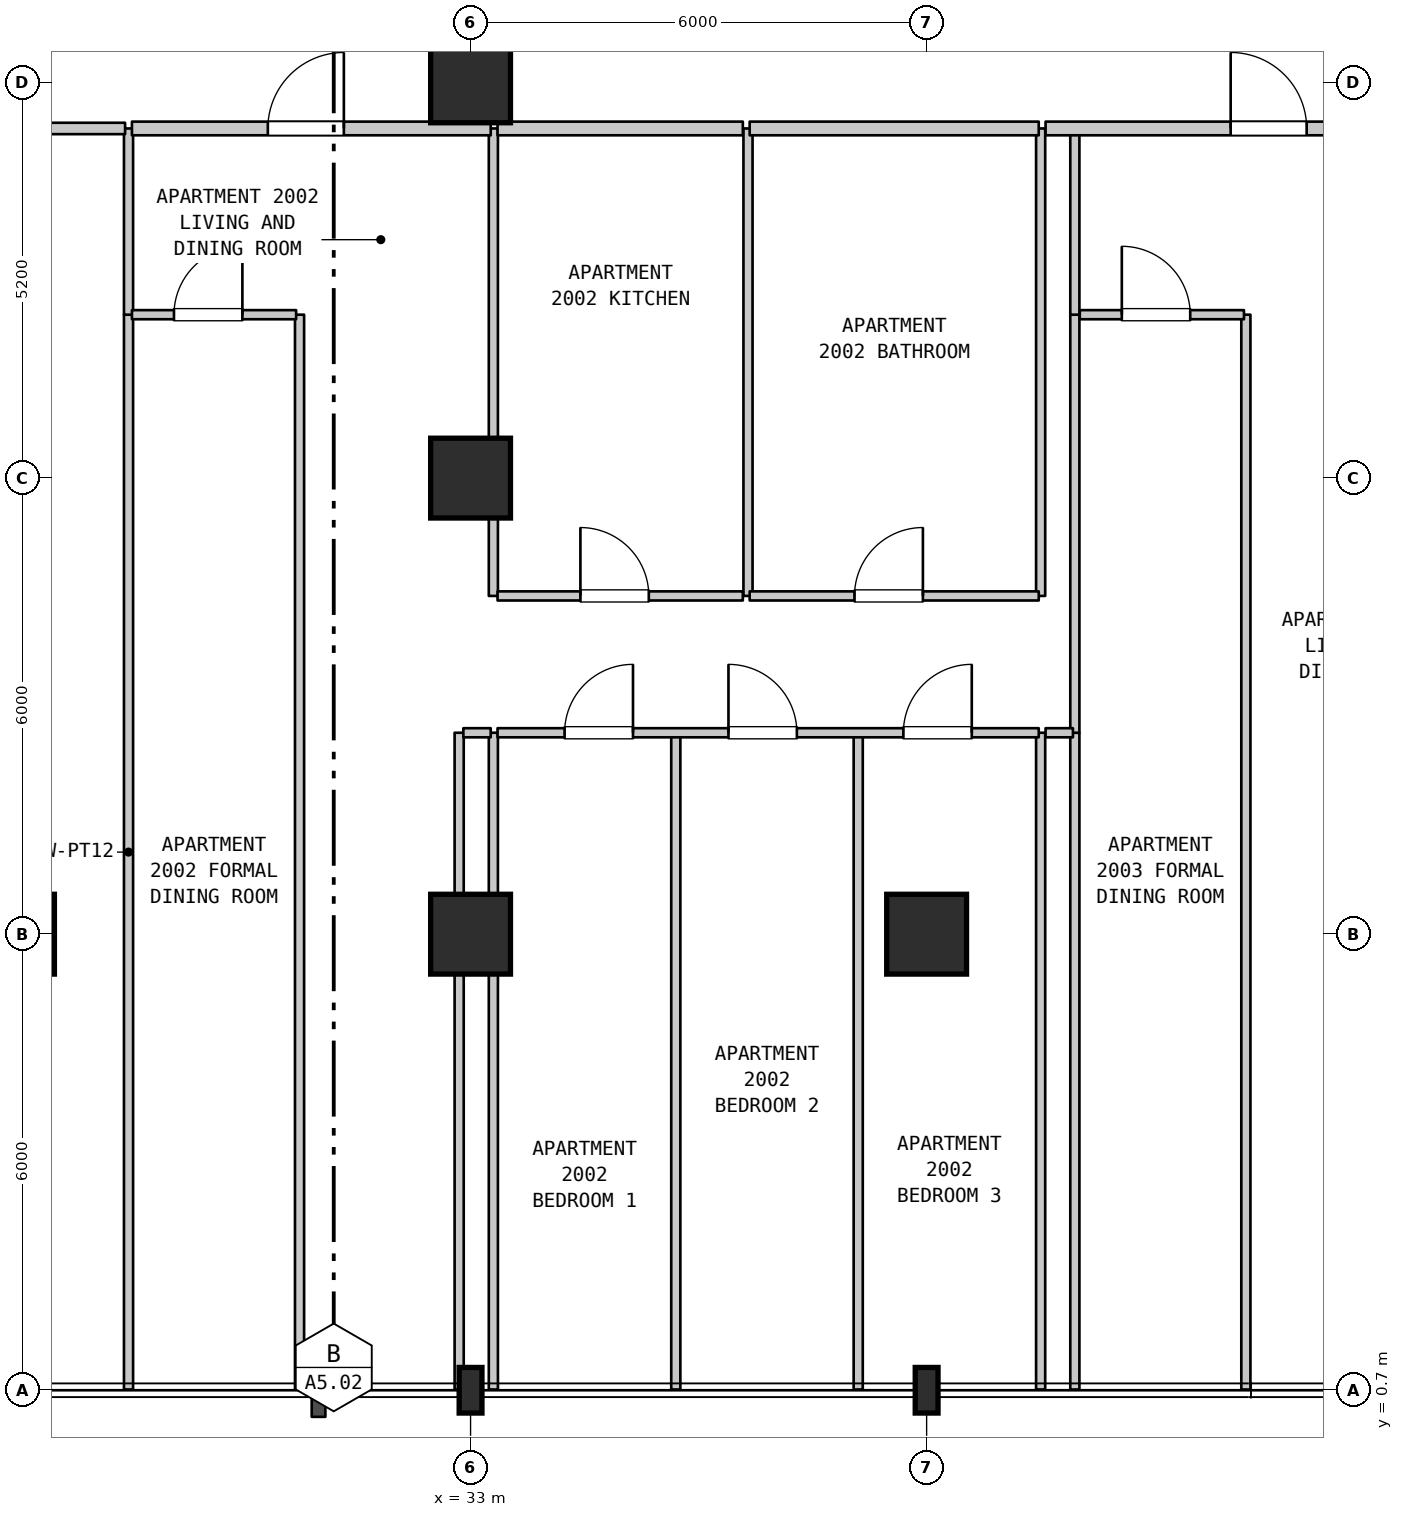
"""IFC4 building model, lengths in metres.
Left out: names, types, materials, properties, quantities, classifications, styles, units other than length and angle.
Written with IfcOpenShell. Run it as: python <this file> out.ifc"""

import sys

from ifc_helpers import new_model, si_unit, direction, frame, frame_2d, origin, origin_2d, place, context, subcontext, project, spatial, rectangle, i_section, extrude, element, fill, save


model = new_model("IFC4")
c1 = context("Model", 3, precision=1e-05, world=origin(), true_north=direction((0.0, 1.0)))
c2 = subcontext(c1, "Body", "Model", "MODEL_VIEW")
j1 = project(units=[si_unit("LENGTHUNIT", "METRE"), si_unit("PLANEANGLEUNIT", "RADIAN")], contexts=[c1])
p1 = place(None, origin())
s1 = spatial("IfcSite", under=j1, at=p1, CompositionType="ELEMENT")
p2 = place(p1, origin())
s2 = spatial("IfcBuilding", under=s1, at=p2, CompositionType="ELEMENT")
p3 = place(p2, frame((0.0, 0.0, 86.4)))
s3 = spatial("IfcBuildingStorey", under=s2, at=p3, CompositionType="ELEMENT", Elevation=86.4)
p4 = place(p3, frame((27.0, 6.7, 0.0), z_axis=(0.0, 0.0, 1.0), x_axis=(1.0, 0.0, 0.0)))
e1 = element("IfcColumn", 1, at=p4, inside=s3, PredefinedType="COLUMN", context=c2, shape_type="SweptSolid", body=[
    extrude(rectangle(XDim=1.05, YDim=1.05, at=origin_2d()), origin(), (0.0, 0.0, 1.0), 4.5),
])
p5 = place(p3, frame((33.0, 0.7, 0.0), z_axis=(0.0, 0.0, 1.0), x_axis=(1.0, 0.0, 0.0)))
e2 = element("IfcColumn", 2, at=p5, inside=s3, PredefinedType="COLUMN", context=c2, shape_type="SweptSolid", body=[
    extrude(i_section(OverallWidth=0.3, OverallDepth=0.6, WebThickness=0.015, FlangeThickness=0.03, FilletRadius=0.027, at=origin_2d()), origin(), (0.0, 0.0, 1.0), 4.5),
])
for number, where, z_axis, x_axis in (
    (3, (33.0, 6.7, 0.0), (0.0, 0.0, 1.0), (1.0, 0.0, 0.0)),
    (4, (33.0, 12.7, 0.0), (0.0, 0.0, 1.0), (1.0, 0.0, 0.0)),
    (5, (33.0, 17.9, 0.0), (0.0, 0.0, 1.0), (1.0, 0.0, 0.0)),
):
    element("IfcColumn", number, at=place(p3, frame(where, z_axis=z_axis, x_axis=x_axis)), inside=s3, PredefinedType="COLUMN", context=c2, shape_type="SweptSolid", body=[
        extrude(rectangle(XDim=1.05, YDim=1.05, at=origin_2d()), origin(), (0.0, 0.0, 1.0), 4.5),
    ])
p6 = place(p3, frame((39.0, 0.7, 0.0), z_axis=(0.0, 0.0, 1.0), x_axis=(1.0, 0.0, 0.0)))
e6 = element("IfcColumn", 6, at=p6, inside=s3, PredefinedType="COLUMN", context=c2, shape_type="SweptSolid", body=[
    extrude(i_section(OverallWidth=0.3, OverallDepth=0.6, WebThickness=0.015, FlangeThickness=0.03, FilletRadius=0.027, at=origin_2d()), origin(), (0.0, 0.0, 1.0), 4.5),
])
p7 = place(p3, frame((39.0, 6.7, 0.0), z_axis=(0.0, 0.0, 1.0), x_axis=(1.0, 0.0, 0.0)))
e7 = element("IfcColumn", 7, at=p7, inside=s3, PredefinedType="COLUMN", context=c2, shape_type="SweptSolid", body=[
    extrude(rectangle(XDim=1.05, YDim=1.05, at=origin_2d()), origin(), (0.0, 0.0, 1.0), 4.5),
])
p8 = place(p3, frame((28.5, 0.71, 0.0), z_axis=(0.0, 0.0, 1.0), x_axis=(0.0, 1.0, 0.0)))
e8 = element("IfcWall", 8, at=p8, inside=s3, PredefinedType="PARTITIONING", context=c2, shape_type="SweptSolid", body=[
    extrude(rectangle(XDim=14.14, YDim=0.12, at=frame_2d((7.07, 0.0))), origin(), (0.0, 0.0, 1.0), 4.185),
])
p9 = place(p3, frame((28.5, 14.85, 0.0), z_axis=(0.0, 0.0, 1.0), x_axis=(0.0, 1.0, 0.0)))
e9 = element("IfcWall", 9, at=p9, inside=s3, PredefinedType="PARTITIONING", context=c2, shape_type="SweptSolid", body=[
    extrude(rectangle(XDim=2.45, YDim=0.12, at=frame_2d((1.225, 0.0))), origin(), (0.0, 0.0, 1.0), 4.185),
])
p10 = place(p3, frame((30.75, 0.71, 0.0), z_axis=(0.0, 0.0, 1.0), x_axis=(0.0, 1.0, 0.0)))
e10 = element("IfcWall", 10, at=p10, inside=s3, PredefinedType="PARTITIONING", context=c2, shape_type="SweptSolid", body=[
    extrude(rectangle(XDim=14.14, YDim=0.12, at=frame_2d((7.07, 0.0))), origin(), (0.0, 0.0, 1.0), 4.185),
])
for number, where, z_axis, x_axis in (
    (11, (32.85, 0.71, 0.0), (0.0, 0.0, 1.0), (0.0, 1.0, 0.0)),
    (12, (33.3, 0.71, 0.0), (0.0, 0.0, 1.0), (0.0, 1.0, 0.0)),
):
    element("IfcWall", number, at=place(p3, frame(where, z_axis=z_axis, x_axis=x_axis)), inside=s3, PredefinedType="PARTITIONING", context=c2, shape_type="SweptSolid", body=[
        extrude(rectangle(XDim=8.64, YDim=0.12, at=frame_2d((4.32, 0.0))), origin(), (0.0, 0.0, 1.0), 4.185),
    ])
p11 = place(p3, frame((33.3, 11.15, 0.0), z_axis=(0.0, 0.0, 1.0), x_axis=(0.0, 1.0, 0.0)))
e13 = element("IfcWall", 13, at=p11, inside=s3, PredefinedType="PARTITIONING", context=c2, shape_type="SweptSolid", body=[
    extrude(rectangle(XDim=6.15, YDim=0.12, at=frame_2d((3.075, 0.0))), origin(), (0.0, 0.0, 1.0), 4.185),
])
p12 = place(p3, frame((35.7, 0.71, 0.0), z_axis=(0.0, 0.0, 1.0), x_axis=(0.0, 1.0, 0.0)))
e14 = element("IfcWall", 14, at=p12, inside=s3, PredefinedType="PARTITIONING", context=c2, shape_type="SweptSolid", body=[
    extrude(rectangle(XDim=8.64, YDim=0.12, at=frame_2d((4.32, 0.0))), origin(), (0.0, 0.0, 1.0), 4.185),
])
p13 = place(p3, frame((36.65, 11.15, 0.0), z_axis=(0.0, 0.0, 1.0), x_axis=(0.0, 1.0, 0.0)))
e15 = element("IfcWall", 15, at=p13, inside=s3, PredefinedType="PARTITIONING", context=c2, shape_type="SweptSolid", body=[
    extrude(rectangle(XDim=6.15, YDim=0.12, at=frame_2d((3.075, 0.0))), origin(), (0.0, 0.0, 1.0), 4.185),
])
for number, where, z_axis, x_axis in (
    (16, (38.1, 0.71, 0.0), (0.0, 0.0, 1.0), (0.0, 1.0, 0.0)),
    (17, (40.5, 0.71, 0.0), (0.0, 0.0, 1.0), (0.0, 1.0, 0.0)),
):
    element("IfcWall", number, at=place(p3, frame(where, z_axis=z_axis, x_axis=x_axis)), inside=s3, PredefinedType="PARTITIONING", context=c2, shape_type="SweptSolid", body=[
        extrude(rectangle(XDim=8.64, YDim=0.12, at=frame_2d((4.32, 0.0))), origin(), (0.0, 0.0, 1.0), 4.185),
    ])
p14 = place(p3, frame((40.5, 11.15, 0.0), z_axis=(0.0, 0.0, 1.0), x_axis=(0.0, 1.0, 0.0)))
e18 = element("IfcWall", 18, at=p14, inside=s3, PredefinedType="PARTITIONING", context=c2, shape_type="SweptSolid", body=[
    extrude(rectangle(XDim=6.15, YDim=0.12, at=frame_2d((3.075, 0.0))), origin(), (0.0, 0.0, 1.0), 4.185),
])
p15 = place(p3, frame((40.95, 0.71, 0.0), z_axis=(0.0, 0.0, 1.0), x_axis=(0.0, 1.0, 0.0)))
e19 = element("IfcWall", 19, at=p15, inside=s3, PredefinedType="PARTITIONING", context=c2, shape_type="SweptSolid", body=[
    extrude(rectangle(XDim=8.64, YDim=0.12, at=frame_2d((4.32, 0.0))), origin(), (0.0, 0.0, 1.0), 4.185),
])
p16 = place(p3, frame((40.95, 9.35, 0.0), z_axis=(0.0, 0.0, 1.0), x_axis=(0.0, 1.0, 0.0)))
e20 = element("IfcWall", 20, at=p16, inside=s3, PredefinedType="PARTITIONING", context=c2, shape_type="SweptSolid", body=[
    extrude(rectangle(XDim=5.5, YDim=0.12, at=frame_2d((2.75, 0.0))), origin(), (0.0, 0.0, 1.0), 4.185),
])
p17 = place(p3, frame((40.95, 14.85, 0.0), z_axis=(0.0, 0.0, 1.0), x_axis=(0.0, 1.0, 0.0)))
e21 = element("IfcWall", 21, at=p17, inside=s3, PredefinedType="PARTITIONING", context=c2, shape_type="SweptSolid", body=[
    extrude(rectangle(XDim=2.45, YDim=0.12, at=frame_2d((1.225, 0.0))), origin(), (0.0, 0.0, 1.0), 4.185),
])
p18 = place(p3, frame((43.2, 0.71, 0.0), z_axis=(0.0, 0.0, 1.0), x_axis=(0.0, 1.0, 0.0)))
e22 = element("IfcWall", 22, at=p18, inside=s3, PredefinedType="PARTITIONING", context=c2, shape_type="SweptSolid", body=[
    extrude(rectangle(XDim=14.14, YDim=0.12, at=frame_2d((7.07, 0.0))), origin(), (0.0, 0.0, 1.0), 4.185),
])
p19 = place(p3, frame((32.905, 9.35, 0.0), z_axis=(0.0, 0.0, 1.0), x_axis=(1.0, 0.0, 0.0)))
e23 = element("IfcWall", 23, at=p19, inside=s3, PredefinedType="PARTITIONING", context=c2, shape_type="SweptSolid", body=[
    extrude(rectangle(XDim=0.36, YDim=0.12, at=frame_2d((0.18, 0.0))), origin(), (0.0, 0.0, 1.0), 4.185),
])
p20 = place(p3, frame((33.355, 9.35, 0.0), z_axis=(0.0, 0.0, 1.0), x_axis=(1.0, 0.0, 0.0)))
e24 = element("IfcWall", 24, at=p20, inside=s3, PredefinedType="PARTITIONING", context=c2, shape_type="SweptSolid", body=[
    extrude(rectangle(XDim=7.12, YDim=0.12, at=frame_2d((3.56, 0.0))), origin(), (0.0, 0.0, 1.0), 4.185),
])
p21 = place(p20, frame((0.882, 0.0, 0.0)))
e25 = element("IfcOpeningElement", 25, at=p21, cuts=e24, PredefinedType="OPENING", context=c2, shape_type="SweptSolid", body=[
    extrude(rectangle(XDim=0.9, YDim=2.15, at=frame_2d((0.45, 1.075))), frame((0.0, 0.07, 0.0), z_axis=(0.0, -1.0, 0.0), x_axis=(1.0, 0.0, 0.0)), (0.0, 0.0, 1.0), 0.14),
])
p22 = place(p20, frame((3.038, 0.0, 0.0)))
e26 = element("IfcOpeningElement", 26, at=p22, cuts=e24, PredefinedType="OPENING", context=c2, shape_type="SweptSolid", body=[
    extrude(rectangle(XDim=0.9, YDim=2.15, at=frame_2d((0.45, 1.075))), frame((0.0, 0.07, 0.0), z_axis=(0.0, -1.0, 0.0), x_axis=(1.0, 0.0, 0.0)), (0.0, 0.0, 1.0), 0.14),
])
p23 = place(p20, frame((5.339, 0.0, 0.0)))
e27 = element("IfcOpeningElement", 27, at=p23, cuts=e24, PredefinedType="OPENING", context=c2, shape_type="SweptSolid", body=[
    extrude(rectangle(XDim=0.9, YDim=2.15, at=frame_2d((0.45, 1.075))), frame((0.0, 0.07, 0.0), z_axis=(0.0, -1.0, 0.0), x_axis=(1.0, 0.0, 0.0)), (0.0, 0.0, 1.0), 0.14),
])
p24 = place(p3, frame((40.565, 9.35, 0.0), z_axis=(0.0, 0.0, 1.0), x_axis=(1.0, 0.0, 0.0)))
e28 = element("IfcWall", 28, at=p24, inside=s3, PredefinedType="PARTITIONING", context=c2, shape_type="SweptSolid", body=[
    extrude(rectangle(XDim=0.36, YDim=0.12, at=frame_2d((0.18, 0.0))), origin(), (0.0, 0.0, 1.0), 4.185),
])
p25 = place(p3, frame((33.355, 11.15, 0.0), z_axis=(0.0, 0.0, 1.0), x_axis=(1.0, 0.0, 0.0)))
e29 = element("IfcWall", 29, at=p25, inside=s3, PredefinedType="PARTITIONING", context=c2, shape_type="SweptSolid", body=[
    extrude(rectangle(XDim=3.227, YDim=0.12, at=frame_2d((1.614, 0.0))), origin(), (0.0, 0.0, 1.0), 4.185),
])
p26 = place(p25, frame((1.09, 0.0, 0.0)))
e30 = element("IfcOpeningElement", 30, at=p26, cuts=e29, PredefinedType="OPENING", context=c2, shape_type="SweptSolid", body=[
    extrude(rectangle(XDim=0.9, YDim=2.15, at=frame_2d((0.45, 1.075))), frame((0.0, 0.07, 0.0), z_axis=(0.0, -1.0, 0.0), x_axis=(1.0, 0.0, 0.0)), (0.0, 0.0, 1.0), 0.14),
])
p27 = place(p3, frame((36.672, 11.15, 0.0), z_axis=(0.0, 0.0, 1.0), x_axis=(1.0, 0.0, 0.0)))
e31 = element("IfcWall", 31, at=p27, inside=s3, PredefinedType="PARTITIONING", context=c2, shape_type="SweptSolid", body=[
    extrude(rectangle(XDim=3.803, YDim=0.12, at=frame_2d((1.901, 0.0))), origin(), (0.0, 0.0, 1.0), 4.185),
])
p28 = place(p27, frame((1.379, 0.0, 0.0)))
e32 = element("IfcOpeningElement", 32, at=p28, cuts=e31, PredefinedType="OPENING", context=c2, shape_type="SweptSolid", body=[
    extrude(rectangle(XDim=0.9, YDim=2.1, at=frame_2d((0.45, 1.05))), frame((0.0, 0.07, 0.0), z_axis=(0.0, -1.0, 0.0), x_axis=(1.0, 0.0, 0.0)), (0.0, 0.0, 1.0), 0.14),
])
p29 = place(p3, frame((28.545, 14.85, 0.0), z_axis=(0.0, 0.0, 1.0), x_axis=(1.0, 0.0, 0.0)))
e33 = element("IfcWall", 33, at=p29, inside=s3, PredefinedType="PARTITIONING", context=c2, shape_type="SweptSolid", body=[
    extrude(rectangle(XDim=2.16, YDim=0.12, at=frame_2d((1.08, 0.0))), origin(), (0.0, 0.0, 1.0), 4.185),
])
p30 = place(p29, frame((0.553, 0.0, 0.0)))
e34 = element("IfcOpeningElement", 34, at=p30, cuts=e33, PredefinedType="OPENING", context=c2, shape_type="SweptSolid", body=[
    extrude(rectangle(XDim=0.9, YDim=2.15, at=frame_2d((0.45, 1.075))), frame((0.0, 0.07, 0.0), z_axis=(0.0, -1.0, 0.0), x_axis=(1.0, 0.0, 0.0)), (0.0, 0.0, 1.0), 0.14),
])
p31 = place(p3, frame((41.015, 14.85, 0.0), z_axis=(0.0, 0.0, 1.0), x_axis=(1.0, 0.0, 0.0)))
e35 = element("IfcWall", 35, at=p31, inside=s3, PredefinedType="PARTITIONING", context=c2, shape_type="SweptSolid", body=[
    extrude(rectangle(XDim=2.16, YDim=0.12, at=frame_2d((1.08, 0.0))), origin(), (0.0, 0.0, 1.0), 4.185),
])
p32 = place(p31, frame((0.553, 0.0, 0.0)))
e36 = element("IfcOpeningElement", 36, at=p32, cuts=e35, PredefinedType="OPENING", context=c2, shape_type="SweptSolid", body=[
    extrude(rectangle(XDim=0.9, YDim=2.15, at=frame_2d((0.45, 1.075))), frame((0.0, 0.07, 0.0), z_axis=(0.0, -1.0, 0.0), x_axis=(1.0, 0.0, 0.0)), (0.0, 0.0, 1.0), 0.14),
])
p33 = place(p3, frame((21.045, 17.3, 0.0), z_axis=(0.0, 0.0, 1.0), x_axis=(1.0, 0.0, 0.0)))
e37 = element("IfcWall", 37, at=p33, inside=s3, PredefinedType="STANDARD", context=c2, shape_type="SweptSolid", body=[
    extrude(rectangle(XDim=7.41, YDim=0.15, at=frame_2d((3.705, 0.0))), origin(), (0.0, 0.0, 1.0), 4.185),
])
p34 = place(p33, frame((3.135, 0.0, 0.0)))
e38 = element("IfcOpeningElement", 38, at=p34, cuts=e37, PredefinedType="OPENING", context=c2, shape_type="SweptSolid", body=[
    extrude(rectangle(XDim=1.0, YDim=2.15, at=frame_2d((0.5, 1.075))), frame((0.0, 0.085, 0.0), z_axis=(0.0, -1.0, 0.0), x_axis=(1.0, 0.0, 0.0)), (0.0, 0.0, 1.0), 0.17),
])
p35 = place(p3, frame((28.545, 17.3, 0.0), z_axis=(0.0, 0.0, 1.0), x_axis=(1.0, 0.0, 0.0)))
e39 = element("IfcWall", 39, at=p35, inside=s3, PredefinedType="STANDARD", context=c2, shape_type="SweptSolid", body=[
    extrude(rectangle(XDim=4.72, YDim=0.18, at=frame_2d((2.36, 0.0))), origin(), (0.0, 0.0, 1.0), 4.185),
])
p36 = place(p35, frame((1.788, 0.0, 0.0)))
e40 = element("IfcOpeningElement", 40, at=p36, cuts=e39, PredefinedType="OPENING", context=c2, shape_type="SweptSolid", body=[
    extrude(rectangle(XDim=1.0, YDim=2.15, at=frame_2d((0.5, 1.075))), frame((0.0, 0.1, 0.0), z_axis=(0.0, -1.0, 0.0), x_axis=(1.0, 0.0, 0.0)), (0.0, 0.0, 1.0), 0.2),
])
p37 = place(p3, frame((33.355, 17.3, 0.0), z_axis=(0.0, 0.0, 1.0), x_axis=(1.0, 0.0, 0.0)))
e41 = element("IfcWall", 41, at=p37, inside=s3, PredefinedType="STANDARD", context=c2, shape_type="SweptSolid", body=[
    extrude(rectangle(XDim=3.227, YDim=0.18, at=frame_2d((1.614, 0.0))), origin(), (0.0, 0.0, 1.0), 4.185),
])
p38 = place(p3, frame((36.672, 17.3, 0.0), z_axis=(0.0, 0.0, 1.0), x_axis=(1.0, 0.0, 0.0)))
e42 = element("IfcWall", 42, at=p38, inside=s3, PredefinedType="STANDARD", context=c2, shape_type="SweptSolid", body=[
    extrude(rectangle(XDim=3.803, YDim=0.18, at=frame_2d((1.901, 0.0))), origin(), (0.0, 0.0, 1.0), 4.185),
])
p39 = place(p3, frame((40.565, 17.3, 0.0), z_axis=(0.0, 0.0, 1.0), x_axis=(1.0, 0.0, 0.0)))
e43 = element("IfcWall", 43, at=p39, inside=s3, PredefinedType="STANDARD", context=c2, shape_type="SweptSolid", body=[
    extrude(rectangle(XDim=5.545, YDim=0.18, at=frame_2d((2.772, 0.0))), origin(), (0.0, 0.0, 1.0), 4.185),
])
p40 = place(p39, frame((2.435, 0.0, 0.0)))
e44 = element("IfcOpeningElement", 44, at=p40, cuts=e43, PredefinedType="OPENING", context=c2, shape_type="SweptSolid", body=[
    extrude(rectangle(XDim=1.0, YDim=2.15, at=frame_2d((0.5, 1.075))), frame((0.0, 0.1, 0.0), z_axis=(0.0, -1.0, 0.0), x_axis=(1.0, 0.0, 0.0)), (0.0, 0.0, 1.0), 0.2),
])
p41 = place(p21, origin())
e45 = element("IfcDoor", 45, at=p41, inside=s3, OperationType="SINGLE_SWING_RIGHT", PredefinedType="DOOR", context=c2, shape_type="SweptSolid", body=[
    extrude(rectangle(XDim=0.9, YDim=2.15, at=frame_2d((0.45, 1.075))), frame((0.0, 0.025, 0.0), z_axis=(0.0, -1.0, 0.0), x_axis=(1.0, 0.0, 0.0)), (0.0, 0.0, 1.0), 0.05),
])
fill(e25, e45)
p42 = place(p22, origin())
e46 = element("IfcDoor", 46, at=p42, inside=s3, OperationType="SINGLE_SWING_LEFT", PredefinedType="DOOR", context=c2, shape_type="SweptSolid", body=[
    extrude(rectangle(XDim=0.9, YDim=2.15, at=frame_2d((0.45, 1.075))), frame((0.0, 0.025, 0.0), z_axis=(0.0, -1.0, 0.0), x_axis=(1.0, 0.0, 0.0)), (0.0, 0.0, 1.0), 0.05),
])
fill(e26, e46)
p43 = place(p23, origin())
e47 = element("IfcDoor", 47, at=p43, inside=s3, OperationType="SINGLE_SWING_RIGHT", PredefinedType="DOOR", context=c2, shape_type="SweptSolid", body=[
    extrude(rectangle(XDim=0.9, YDim=2.15, at=frame_2d((0.45, 1.075))), frame((0.0, 0.025, 0.0), z_axis=(0.0, -1.0, 0.0), x_axis=(1.0, 0.0, 0.0)), (0.0, 0.0, 1.0), 0.05),
])
fill(e27, e47)
p44 = place(p26, origin())
e48 = element("IfcDoor", 48, at=p44, inside=s3, OperationType="SINGLE_SWING_LEFT", PredefinedType="DOOR", context=c2, shape_type="SweptSolid", body=[
    extrude(rectangle(XDim=0.9, YDim=2.15, at=frame_2d((0.45, 1.075))), frame((0.0, 0.025, 0.0), z_axis=(0.0, -1.0, 0.0), x_axis=(1.0, 0.0, 0.0)), (0.0, 0.0, 1.0), 0.05),
])
fill(e30, e48)
p45 = place(p28, origin())
e49 = element("IfcDoor", 49, at=p45, inside=s3, OperationType="SINGLE_SWING_RIGHT", PredefinedType="DOOR", context=c2, shape_type="SweptSolid", body=[
    extrude(rectangle(XDim=0.9, YDim=2.1, at=frame_2d((0.45, 1.05))), frame((0.0, 0.025, 0.0), z_axis=(0.0, -1.0, 0.0), x_axis=(1.0, 0.0, 0.0)), (0.0, 0.0, 1.0), 0.05),
])
fill(e32, e49)
p46 = place(p30, origin())
e50 = element("IfcDoor", 50, at=p46, inside=s3, OperationType="SINGLE_SWING_RIGHT", PredefinedType="DOOR", context=c2, shape_type="SweptSolid", body=[
    extrude(rectangle(XDim=0.9, YDim=2.15, at=frame_2d((0.45, 1.075))), frame((0.0, 0.025, 0.0), z_axis=(0.0, -1.0, 0.0), x_axis=(1.0, 0.0, 0.0)), (0.0, 0.0, 1.0), 0.05),
])
fill(e34, e50)
p47 = place(p32, origin())
e51 = element("IfcDoor", 51, at=p47, inside=s3, OperationType="SINGLE_SWING_LEFT", PredefinedType="DOOR", context=c2, shape_type="SweptSolid", body=[
    extrude(rectangle(XDim=0.9, YDim=2.15, at=frame_2d((0.45, 1.075))), frame((0.0, 0.025, 0.0), z_axis=(0.0, -1.0, 0.0), x_axis=(1.0, 0.0, 0.0)), (0.0, 0.0, 1.0), 0.05),
])
fill(e36, e51)
p48 = place(p36, origin())
e52 = element("IfcDoor", 52, at=p48, inside=s3, OperationType="SINGLE_SWING_RIGHT", PredefinedType="DOOR", context=c2, shape_type="SweptSolid", body=[
    extrude(rectangle(XDim=1.0, YDim=2.15, at=frame_2d((0.5, 1.075))), frame((0.0, 0.025, 0.0), z_axis=(0.0, -1.0, 0.0), x_axis=(1.0, 0.0, 0.0)), (0.0, 0.0, 1.0), 0.05),
])
fill(e40, e52)
p49 = place(p40, origin())
e53 = element("IfcDoor", 53, at=p49, inside=s3, OperationType="SINGLE_SWING_LEFT", PredefinedType="DOOR", context=c2, shape_type="SweptSolid", body=[
    extrude(rectangle(XDim=1.0, YDim=2.15, at=frame_2d((0.5, 1.075))), frame((0.0, 0.025, 0.0), z_axis=(0.0, -1.0, 0.0), x_axis=(1.0, 0.0, 0.0)), (0.0, 0.0, 1.0), 0.05),
])
fill(e44, e53)
save(model, sys.argv[1])
